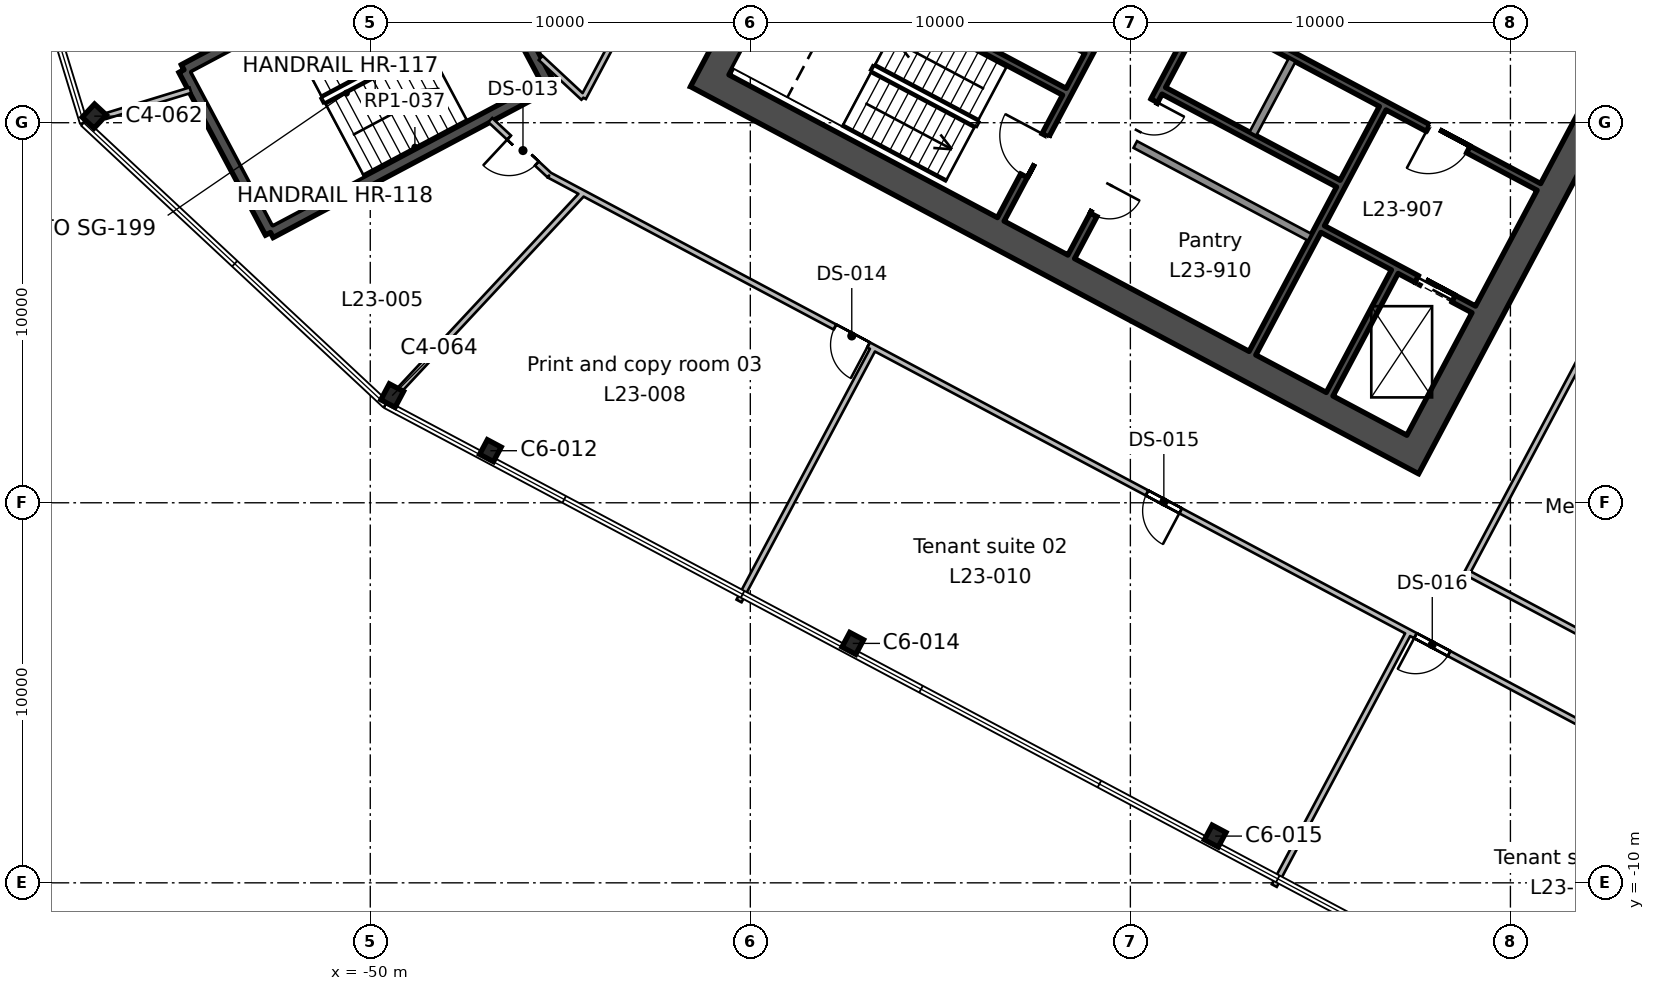
"""IFC4 building model, lengths in metres.
Left out: names, types, materials, properties, quantities, classifications, styles, units other than length and angle.
Written with IfcOpenShell. Run it as: python <this file> out.ifc"""

import sys

from ifc_helpers import new_model, si_unit, direction, frame, frame_2d, origin, origin_2d, place, context, subcontext, project, spatial, rectangle, i_section, extrude, element, fill, save


model = new_model("IFC4")
c1 = context("Model", 3, precision=1e-05, world=origin(), true_north=direction((0.0, 1.0)))
c2 = subcontext(c1, "Body", "Model", "MODEL_VIEW")
j1 = project(units=[si_unit("LENGTHUNIT", "METRE"), si_unit("PLANEANGLEUNIT", "RADIAN")], contexts=[c1])
p1 = place(None, origin())
s1 = spatial("IfcSite", under=j1, at=p1, CompositionType="ELEMENT")
p2 = place(p1, origin())
s2 = spatial("IfcBuilding", under=s1, at=p2, CompositionType="ELEMENT")
p3 = place(p2, frame((0.0, 0.0, 118.2)))
s3 = spatial("IfcBuildingStorey", under=s2, at=p3, CompositionType="ELEMENT", Elevation=118.2)
for number, where, z_axis, x_axis in (
    (1, (-27.768, -8.77, 0.0), (0.0, 0.0, 1.0), (0.883, -0.469, 0.0)),
    (2, (-37.304, -3.7, 0.0), (0.0, 0.0, 1.0), (0.883, -0.469, 0.0)),
    (3, (-46.839, 1.37, 0.0), (0.0, 0.0, 1.0), (0.883, -0.469, 0.0)),
):
    element("IfcColumn", number, at=place(p3, frame(where, z_axis=z_axis, x_axis=x_axis)), inside=s3, PredefinedType="COLUMN", context=c2, shape_type="SweptSolid", body=[
        extrude(i_section(OverallWidth=0.412, OverallDepth=0.434, WebThickness=0.036, FlangeThickness=0.057, FilletRadius=0.015, at=origin_2d()), origin(), (0.0, 0.0, 1.0), 4.0),
    ])
for number, where, z_axis, x_axis in (
    (4, (-49.423, 2.82, 0.0), (0.0, 0.0, 1.0), (0.883, -0.469, 0.0)),
    (5, (-57.262, 10.173, 0.0), (0.0, 0.0, 1.0), (0.731, -0.682, 0.0)),
):
    element("IfcColumn", number, at=place(p3, frame(where, z_axis=z_axis, x_axis=x_axis)), inside=s3, PredefinedType="COLUMN", context=c2, shape_type="SweptSolid", body=[
        extrude(i_section(OverallWidth=0.424, OverallDepth=0.475, WebThickness=0.048, FlangeThickness=0.077, FilletRadius=0.015, at=origin_2d()), origin(), (0.0, 0.0, 1.0), 4.0),
    ])
p4 = place(p3, frame((-13.498, 18.333, 0.0), z_axis=(0.0, 0.0, 1.0), x_axis=(-0.469469918705, -0.88294846703, 0.0)))
e6 = element("IfcWall", 6, at=p4, inside=s3, PredefinedType="SHEAR", context=c2, shape_type="SweptSolid", body=[
    extrude(rectangle(XDim=19.7, YDim=0.75, at=frame_2d((9.85, 0.0))), origin(), (0.0, 0.0, 1.0), 4.0),
])
p5 = place(p4, frame((6.85, 0.0, 0.0)))
e7 = element("IfcOpeningElement", 7, at=p5, cuts=e6, PredefinedType="OPENING", context=c2, shape_type="SweptSolid", body=[
    extrude(rectangle(XDim=2.4, YDim=2.4, at=frame_2d((1.2, 1.2))), frame((0.0, 0.385, 0.0), z_axis=(0.0, -1.0, 0.0), x_axis=(1.0, 0.0, 0.0)), (0.0, 0.0, 1.0), 0.77),
])
p6 = place(p3, frame((-31.996, 28.168, 0.0), z_axis=(0.0, 0.0, 1.0), x_axis=(-0.469479580143, -0.882943329908, 0.0)))
e8 = element("IfcWall", 8, at=p6, inside=s3, PredefinedType="SHEAR", context=c2, shape_type="SweptSolid", body=[
    extrude(rectangle(XDim=19.7, YDim=0.75, at=frame_2d((9.85, 0.0))), origin(), (0.0, 0.0, 1.0), 4.0),
])
p7 = place(p6, frame((10.45, 0.0, 0.0)))
e9 = element("IfcOpeningElement", 9, at=p7, cuts=e8, PredefinedType="OPENING", context=c2, shape_type="SweptSolid", body=[
    extrude(rectangle(XDim=2.4, YDim=2.4, at=frame_2d((1.2, 1.2))), frame((0.0, 0.385, 0.0), z_axis=(0.0, -1.0, 0.0), x_axis=(1.0, 0.0, 0.0)), (0.0, 0.0, 1.0), 0.77),
])
p8 = place(p3, frame((-22.902, 1.446, 0.0), z_axis=(0.0, 0.0, 1.0), x_axis=(-0.88294509198, 0.469476266226, 0.0)))
e10 = element("IfcWall", 10, at=p8, inside=s3, PredefinedType="SHEAR", context=c2, shape_type="SweptSolid", body=[
    extrude(rectangle(XDim=20.2, YDim=0.75, at=frame_2d((10.1, 0.0))), origin(), (0.0, 0.0, 1.0), 4.0),
])
p9 = place(p3, frame((-23.043, 6.08, 0.0), z_axis=(0.0, 0.0, 1.0), x_axis=(-0.469494272526, -0.882935517501, 0.0)))
e11 = element("IfcWall", 11, at=p9, inside=s3, PredefinedType="SHEAR", context=c2, shape_type="SweptSolid", body=[
    extrude(rectangle(XDim=3.65, YDim=0.2, at=frame_2d((1.825, 0.0))), origin(), (0.0, 0.0, 1.0), 4.0),
])
p10 = place(p3, frame((-23.36, 10.382, 0.0), z_axis=(0.0, 0.0, 1.0), x_axis=(-0.469480409012, -0.88294288918, 0.0)))
e12 = element("IfcWall", 12, at=p10, inside=s3, PredefinedType="SHEAR", context=c2, shape_type="SweptSolid", body=[
    extrude(rectangle(XDim=7.3, YDim=0.2, at=frame_2d((3.65, 0.0))), origin(), (0.0, 0.0, 1.0), 4.0),
])
p11 = place(p3, frame((-25.744, 11.65, 0.0), z_axis=(0.0, 0.0, 1.0), x_axis=(-0.469487830541, -0.882938942948, 0.0)))
e13 = element("IfcWall", 13, at=p11, inside=s3, PredefinedType="SOLIDWALL", context=c2, shape_type="SweptSolid", body=[
    extrude(rectangle(XDim=2.2, YDim=0.2, at=frame_2d((1.1, 0.0))), origin(), (0.0, 0.0, 1.0), 4.0),
])
p12 = place(p3, frame((-28.128, 12.917, 0.0), z_axis=(0.0, 0.0, 1.0), x_axis=(-0.469454336211, -0.882956752176, 0.0)))
e14 = element("IfcWall", 14, at=p12, inside=s3, PredefinedType="SHEAR", context=c2, shape_type="SweptSolid", body=[
    extrude(rectangle(XDim=7.3, YDim=0.2, at=frame_2d((3.65, 0.0))), origin(), (0.0, 0.0, 1.0), 4.0),
])
p13 = place(p12, frame((2.65, 0.0, 0.0)))
e15 = element("IfcOpeningElement", 15, at=p13, cuts=e14, PredefinedType="OPENING", context=c2, shape_type="SweptSolid", body=[
    extrude(rectangle(XDim=0.9, YDim=2.1, at=frame_2d((0.45, 1.05))), frame((0.0, 0.11, 0.0), z_axis=(0.0, -1.0, 0.0), x_axis=(1.0, 0.0, 0.0)), (0.0, 0.0, 1.0), 0.22),
])
p14 = place(p12, frame((5.15, 0.0, 0.0)))
e16 = element("IfcOpeningElement", 16, at=p14, cuts=e14, PredefinedType="OPENING", context=c2, shape_type="SweptSolid", body=[
    extrude(rectangle(XDim=0.9, YDim=2.1, at=frame_2d((0.45, 1.05))), frame((0.0, 0.11, 0.0), z_axis=(0.0, -1.0, 0.0), x_axis=(1.0, 0.0, 0.0)), (0.0, 0.0, 1.0), 0.22),
])
p15 = place(p3, frame((-29.982, 13.903, 0.0), z_axis=(0.0, 0.0, 1.0), x_axis=(-0.469454336211, -0.882956752176, 0.0)))
e17 = element("IfcWall", 17, at=p15, inside=s3, PredefinedType="SHEAR", context=c2, shape_type="SweptSolid", body=[
    extrude(rectangle(XDim=7.3, YDim=0.2, at=frame_2d((3.65, 0.0))), origin(), (0.0, 0.0, 1.0), 4.0),
])
p16 = place(p15, frame((4.8, 0.0, 0.0)))
e18 = element("IfcOpeningElement", 18, at=p16, cuts=e17, PredefinedType="OPENING", context=c2, shape_type="SweptSolid", body=[
    extrude(rectangle(XDim=1.2, YDim=2.1, at=frame_2d((0.6, 1.05))), frame((0.0, 0.11, 0.0), z_axis=(0.0, -1.0, 0.0), x_axis=(1.0, 0.0, 0.0)), (0.0, 0.0, 1.0), 0.22),
])
p17 = place(p3, frame((-19.252, 8.311, 0.0), z_axis=(0.0, 0.0, 1.0), x_axis=(-0.882955722218, 0.469456273365, 0.0)))
e19 = element("IfcWall", 19, at=p17, inside=s3, PredefinedType="SHEAR", context=c2, shape_type="SweptSolid", body=[
    extrude(rectangle(XDim=10.0, YDim=0.2, at=frame_2d((5.0, 0.0))), origin(), (0.0, 0.0, 1.0), 4.0),
])
p18 = place(p17, frame((2.1, 0.0, 0.0)))
e20 = element("IfcOpeningElement", 20, at=p18, cuts=e19, PredefinedType="OPENING", context=c2, shape_type="SweptSolid", body=[
    extrude(rectangle(XDim=1.2, YDim=2.1, at=frame_2d((0.6, 1.05))), frame((0.0, 0.11, 0.0), z_axis=(0.0, -1.0, 0.0), x_axis=(1.0, 0.0, 0.0)), (0.0, 0.0, 1.0), 0.22),
])
p19 = place(p3, frame((-24.528, 8.398, 0.0), z_axis=(0.0, 0.0, 1.0), x_axis=(-0.882953967957, 0.469459572775, 0.0)))
e21 = element("IfcWall", 21, at=p19, inside=s3, PredefinedType="SHEAR", context=c2, shape_type="SweptSolid", body=[
    extrude(rectangle(XDim=5.2, YDim=0.2, at=frame_2d((2.6, 0.0))), origin(), (0.0, 0.0, 1.0), 4.0),
])
p20 = place(p3, frame((-31.15, 11.919, 0.0), z_axis=(0.0, 0.0, 1.0), x_axis=(-0.882940221191, 0.469485426614, 0.0)))
e22 = element("IfcWall", 22, at=p20, inside=s3, PredefinedType="SHEAR", context=c2, shape_type="SweptSolid", body=[
    extrude(rectangle(XDim=8.0, YDim=0.2, at=frame_2d((4.0, 0.0))), origin(), (0.0, 0.0, 1.0), 4.0),
])
p21 = place(p3, frame((-20.965, 5.088, 0.0), z_axis=(0.0, 0.0, 1.0), x_axis=(-0.882925986334, 0.469512196493, 0.0)))
e23 = element("IfcWall", 23, at=p21, inside=s3, PredefinedType="SHEAR", context=c2, shape_type="SweptSolid", body=[
    extrude(rectangle(XDim=4.5, YDim=0.2, at=frame_2d((2.25, 0.0))), origin(), (0.0, 0.0, 1.0), 4.0),
])
p22 = place(p21, frame((0.6, 0.0, 0.0)))
e24 = element("IfcOpeningElement", 24, at=p22, cuts=e23, PredefinedType="OPENING", context=c2, shape_type="SweptSolid", body=[
    extrude(rectangle(XDim=1.1, YDim=2.1, at=frame_2d((0.55, 1.05))), frame((0.0, 0.11, 0.0), z_axis=(0.0, -1.0, 0.0), x_axis=(1.0, 0.0, 0.0)), (0.0, 0.0, 1.0), 0.22),
])
p23 = place(p3, frame((-31.737, 10.816, 0.0), z_axis=(0.0, 0.0, 1.0), x_axis=(-0.882940221191, 0.469485426614, 0.0)))
e25 = element("IfcWall", 25, at=p23, inside=s3, PredefinedType="SHEAR", context=c2, shape_type="SweptSolid", body=[
    extrude(rectangle(XDim=8.0, YDim=0.2, at=frame_2d((4.0, 0.0))), origin(), (0.0, 0.0, 1.0), 4.0),
])
p24 = place(p3, frame((-25.28, 6.986, 0.0), z_axis=(0.0, 0.0, 1.0), x_axis=(-0.882934506056, 0.469496174655, 0.0)))
e26 = element("IfcWall", 26, at=p24, inside=s3, PredefinedType="SOLIDWALL", context=c2, shape_type="SweptSolid", body=[
    extrude(rectangle(XDim=5.2, YDim=0.2, at=frame_2d((2.6, 0.0))), origin(), (0.0, 0.0, 1.0), 4.0),
])
p25 = place(p3, frame((-47.574, 15.29, 0.0), z_axis=(0.0, 0.0, 1.0), x_axis=(0.469443498566, -0.882962514297, 0.0)))
e27 = element("IfcWall", 27, at=p25, inside=s3, PredefinedType="SHEAR", context=c2, shape_type="SweptSolid", body=[
    extrude(rectangle(XDim=4.85, YDim=0.3, at=frame_2d((2.425, 0.0))), origin(), (0.0, 0.0, 1.0), 4.0),
])
p26 = place(p3, frame((-45.297, 11.007, 0.0), z_axis=(0.0, 0.0, 1.0), x_axis=(-0.882951519127, -0.469464178475, 0.0)))
e28 = element("IfcWall", 28, at=p26, inside=s3, PredefinedType="SHEAR", context=c2, shape_type="SweptSolid", body=[
    extrude(rectangle(XDim=8.3, YDim=0.3, at=frame_2d((4.15, 0.0))), origin(), (0.0, 0.0, 1.0), 4.0),
])
p27 = place(p3, frame((-52.626, 7.111, 0.0), z_axis=(0.0, 0.0, 1.0), x_axis=(-0.469464364128, 0.882951420416, 0.0)))
e29 = element("IfcWall", 29, at=p27, inside=s3, PredefinedType="SHEAR", context=c2, shape_type="SweptSolid", body=[
    extrude(rectangle(XDim=4.85, YDim=0.3, at=frame_2d((2.425, 0.0))), origin(), (0.0, 0.0, 1.0), 4.0),
])
p28 = place(p3, frame((-54.903, 11.393, 0.0), z_axis=(0.0, 0.0, 1.0), x_axis=(0.882939326045, 0.469487110071, 0.0)))
e30 = element("IfcWall", 30, at=p28, inside=s3, PredefinedType="SHEAR", context=c2, shape_type="SweptSolid", body=[
    extrude(rectangle(XDim=8.3, YDim=0.3, at=frame_2d((4.15, 0.0))), origin(), (0.0, 0.0, 1.0), 4.0),
])
p29 = place(p28, frame((6.05, 0.0, 0.0)))
e31 = element("IfcOpeningElement", 31, at=p29, cuts=e30, PredefinedType="OPENING", context=c2, shape_type="SweptSolid", body=[
    extrude(rectangle(XDim=1.9, YDim=2.1, at=frame_2d((0.95, 1.05))), frame((0.0, 0.16, 0.0), z_axis=(0.0, -1.0, 0.0), x_axis=(1.0, 0.0, 0.0)), (0.0, 0.0, 1.0), 0.32),
])
p30 = place(p3, frame((-54.732, 10.857, 0.0), z_axis=(0.0, 0.0, 1.0), x_axis=(-0.956196980242, -0.292723991119, 0.0)))
e32 = element("IfcWall", 32, at=p30, inside=s3, PredefinedType="PARTITIONING", context=c2, shape_type="SweptSolid", body=[
    extrude(rectangle(XDim=2.344, YDim=0.15, at=frame_2d((1.172, 0.0))), origin(), (0.0, 0.0, 1.0), 3.64),
])
p31 = place(p3, frame((-44.402, 8.149, 0.0), z_axis=(0.0, 0.0, 1.0), x_axis=(-0.682039957921, -0.731314908777, 0.0)))
e33 = element("IfcWall", 33, at=p31, inside=s3, PredefinedType="PARTITIONING", context=c2, shape_type="SweptSolid", body=[
    extrude(rectangle(XDim=7.065, YDim=0.15, at=frame_2d((3.533, 0.0))), origin(), (0.0, 0.0, 1.0), 3.64),
])
p32 = place(p3, frame((-36.752, 4.082, 0.0), z_axis=(0.0, 0.0, 1.0), x_axis=(-0.46955237308, -0.88290462052, 0.0)))
e34 = element("IfcWall", 34, at=p32, inside=s3, PredefinedType="PARTITIONING", context=c2, shape_type="SweptSolid", body=[
    extrude(rectangle(XDim=7.55, YDim=0.15, at=frame_2d((3.775, 0.0))), origin(), (0.0, 0.0, 1.0), 3.64),
])
p33 = place(p3, frame((-33.66, 30.844, 0.0), z_axis=(0.0, 0.0, 1.0), x_axis=(-0.469473234242, -0.882946704128, 0.0)))
e35 = element("IfcWall", 35, at=p33, inside=s3, PredefinedType="PARTITIONING", context=c2, shape_type="SweptSolid", body=[
    extrude(rectangle(XDim=22.862, YDim=0.15, at=frame_2d((11.431, 0.0))), origin(), (0.0, 0.0, 1.0), 3.64),
])
p34 = place(p3, frame((-44.393, 10.658, 0.0), z_axis=(0.0, 0.0, 1.0), x_axis=(-0.731694425371, 0.681632795485, 0.0)))
e36 = element("IfcWall", 36, at=p34, inside=s3, PredefinedType="PARTITIONING", context=c2, shape_type="SweptSolid", body=[
    extrude(rectangle(XDim=1.536, YDim=0.15, at=frame_2d((0.768, 0.0))), origin(), (0.0, 0.0, 1.0), 3.64),
])
p35 = place(p3, frame((-44.462, 8.181, 0.0), z_axis=(0.0, 0.0, 1.0), x_axis=(-0.882750253305, 0.469842516478, 0.0)))
e37 = element("IfcWall", 37, at=p35, inside=s3, PredefinedType="PARTITIONING", context=c2, shape_type="SweptSolid", body=[
    extrude(rectangle(XDim=0.935, YDim=0.15, at=frame_2d((0.467, 0.0))), origin(), (0.0, 0.0, 1.0), 3.64),
])
p36 = place(p3, frame((-45.287, 8.62, 0.0), z_axis=(0.0, 0.0, 1.0), x_axis=(-0.731593637228, 0.681740969846, 0.0)))
e38 = element("IfcWall", 38, at=p36, inside=s3, PredefinedType="PARTITIONING", context=c2, shape_type="SweptSolid", body=[
    extrude(rectangle(XDim=2.125, YDim=0.15, at=frame_2d((1.063, 0.0))), origin(), (0.0, 0.0, 1.0), 3.64),
])
p37 = place(p36, frame((0.45, 0.0, 0.0)))
e39 = element("IfcOpeningElement", 39, at=p37, cuts=e38, PredefinedType="OPENING", context=c2, shape_type="SweptSolid", body=[
    extrude(rectangle(XDim=1.0, YDim=2.1, at=frame_2d((0.5, 1.05))), frame((0.0, 0.085, 0.0), z_axis=(0.0, -1.0, 0.0), x_axis=(1.0, 0.0, 0.0)), (0.0, 0.0, 1.0), 0.17),
])
p38 = place(p3, frame((-13.8, -8.122, 0.0), z_axis=(0.0, 0.0, 1.0), x_axis=(-0.882950271686, 0.469466524611, 0.0)))
e40 = element("IfcWall", 40, at=p38, inside=s3, PredefinedType="PARTITIONING", context=c2, shape_type="SweptSolid", body=[
    extrude(rectangle(XDim=34.727, YDim=0.15, at=frame_2d((17.363, 0.0))), origin(), (0.0, 0.0, 1.0), 3.64),
])
p39 = place(p38, frame((26.15, 0.0, 0.0)))
e41 = element("IfcOpeningElement", 41, at=p39, cuts=e40, PredefinedType="OPENING", context=c2, shape_type="SweptSolid", body=[
    extrude(rectangle(XDim=1.0, YDim=2.1, at=frame_2d((0.5, 1.05))), frame((0.0, 0.085, 0.0), z_axis=(0.0, -1.0, 0.0), x_axis=(1.0, 0.0, 0.0)), (0.0, 0.0, 1.0), 0.17),
])
p40 = place(p38, frame((16.85, 0.0, 0.0)))
e42 = element("IfcOpeningElement", 42, at=p40, cuts=e40, PredefinedType="OPENING", context=c2, shape_type="SweptSolid", body=[
    extrude(rectangle(XDim=1.0, YDim=2.1, at=frame_2d((0.5, 1.05))), frame((0.0, 0.085, 0.0), z_axis=(0.0, -1.0, 0.0), x_axis=(1.0, 0.0, 0.0)), (0.0, 0.0, 1.0), 0.17),
])
p41 = place(p38, frame((8.851, 0.0, 0.0)))
e43 = element("IfcOpeningElement", 43, at=p41, cuts=e40, PredefinedType="OPENING", context=c2, shape_type="SweptSolid", body=[
    extrude(rectangle(XDim=1.0, YDim=2.1, at=frame_2d((0.5, 1.05))), frame((0.0, 0.085, 0.0), z_axis=(0.0, -1.0, 0.0), x_axis=(1.0, 0.0, 0.0)), (0.0, 0.0, 1.0), 0.17),
])
p42 = place(p3, frame((-22.67, -3.406, 0.0), z_axis=(0.0, 0.0, 1.0), x_axis=(-0.469451537303, -0.882958240306, 0.0)))
e44 = element("IfcWall", 44, at=p42, inside=s3, PredefinedType="PARTITIONING", context=c2, shape_type="SweptSolid", body=[
    extrude(rectangle(XDim=7.55, YDim=0.15, at=frame_2d((3.775, 0.0))), origin(), (0.0, 0.0, 1.0), 3.64),
])
p43 = place(p3, frame((-21.139, -1.841, 0.0), z_axis=(0.0, 0.0, 1.0), x_axis=(0.46947923089, 0.882943515613, 0.0)))
e45 = element("IfcWall", 45, at=p43, inside=s3, PredefinedType="PARTITIONING", context=c2, shape_type="SweptSolid", body=[
    extrude(rectangle(XDim=23.1, YDim=0.15, at=frame_2d((11.55, 0.0))), origin(), (0.0, 0.0, 1.0), 3.64),
])
p44 = place(p43, frame((11.05, 0.0, 0.0)))
e46 = element("IfcOpeningElement", 46, at=p44, cuts=e45, PredefinedType="OPENING", context=c2, shape_type="SweptSolid", body=[
    extrude(rectangle(XDim=1.0, YDim=2.1, at=frame_2d((0.5, 1.05))), frame((0.0, 0.085, 0.0), z_axis=(0.0, -1.0, 0.0), x_axis=(1.0, 0.0, 0.0)), (0.0, 0.0, 1.0), 0.17),
])
p45 = place(p3, frame((-13.8, -5.744, 0.0), z_axis=(0.0, 0.0, 1.0), x_axis=(-0.882913323819, 0.469536007803, 0.0)))
e47 = element("IfcWall", 47, at=p45, inside=s3, PredefinedType="PARTITIONING", context=c2, shape_type="SweptSolid", body=[
    extrude(rectangle(XDim=8.312, YDim=0.15, at=frame_2d((4.156, 0.0))), origin(), (0.0, 0.0, 1.0), 3.64),
])
p46 = place(p18, origin())
e48 = element("IfcDoor", 48, at=p46, inside=s3, OperationType="SINGLE_SWING_RIGHT", PredefinedType="DOOR", context=c2, shape_type="SweptSolid", body=[
    extrude(rectangle(XDim=1.2, YDim=2.1, at=frame_2d((0.6, 1.05))), frame((0.0, 0.025, 0.0), z_axis=(0.0, -1.0, 0.0), x_axis=(1.0, 0.0, 0.0)), (0.0, 0.0, 1.0), 0.05),
])
fill(e20, e48)
p47 = place(p16, frame((1.2, 0.0, 0.0), z_axis=(0.0, 0.0, 1.0), x_axis=(-1.0, 0.0, 0.0)))
e49 = element("IfcDoor", 49, at=p47, inside=s3, OperationType="SINGLE_SWING_RIGHT", PredefinedType="DOOR", context=c2, shape_type="SweptSolid", body=[
    extrude(rectangle(XDim=1.2, YDim=2.1, at=frame_2d((0.6, 1.05))), frame((0.0, 0.025, 0.0), z_axis=(0.0, -1.0, 0.0), x_axis=(1.0, 0.0, 0.0)), (0.0, 0.0, 1.0), 0.05),
])
fill(e18, e49)
p48 = place(p22, origin())
e50 = element("IfcDoor", 50, at=p48, inside=s3, OperationType="DOUBLE_DOOR_SLIDING", PredefinedType="DOOR", context=c2, shape_type="SweptSolid", body=[
    extrude(rectangle(XDim=1.1, YDim=2.1, at=frame_2d((0.55, 1.05))), frame((0.0, 0.025, 0.0), z_axis=(0.0, -1.0, 0.0), x_axis=(1.0, 0.0, 0.0)), (0.0, 0.0, 1.0), 0.05),
])
fill(e24, e50)
p49 = place(p13, origin())
e51 = element("IfcDoor", 51, at=p49, inside=s3, OperationType="SINGLE_SWING_LEFT", PredefinedType="DOOR", context=c2, shape_type="SweptSolid", body=[
    extrude(rectangle(XDim=0.9, YDim=2.1, at=frame_2d((0.45, 1.05))), frame((0.0, 0.025, 0.0), z_axis=(0.0, -1.0, 0.0), x_axis=(1.0, 0.0, 0.0)), (0.0, 0.0, 1.0), 0.05),
])
fill(e15, e51)
p50 = place(p14, origin())
e52 = element("IfcDoor", 52, at=p50, inside=s3, OperationType="SINGLE_SWING_LEFT", PredefinedType="DOOR", context=c2, shape_type="SweptSolid", body=[
    extrude(rectangle(XDim=0.9, YDim=2.1, at=frame_2d((0.45, 1.05))), frame((0.0, 0.025, 0.0), z_axis=(0.0, -1.0, 0.0), x_axis=(1.0, 0.0, 0.0)), (0.0, 0.0, 1.0), 0.05),
])
fill(e16, e52)
p51 = place(p37, origin())
e53 = element("IfcDoor", 53, at=p51, inside=s3, OperationType="SINGLE_SWING_RIGHT", PredefinedType="DOOR", context=c2, shape_type="SweptSolid", body=[
    extrude(rectangle(XDim=1.0, YDim=2.1, at=frame_2d((0.5, 1.05))), frame((0.0, 0.025, 0.0), z_axis=(0.0, -1.0, 0.0), x_axis=(1.0, 0.0, 0.0)), (0.0, 0.0, 1.0), 0.05),
])
fill(e39, e53)
p52 = place(p39, origin())
e54 = element("IfcDoor", 54, at=p52, inside=s3, OperationType="SINGLE_SWING_LEFT", PredefinedType="DOOR", context=c2, shape_type="SweptSolid", body=[
    extrude(rectangle(XDim=1.0, YDim=2.1, at=frame_2d((0.5, 1.05))), frame((0.0, 0.025, 0.0), z_axis=(0.0, -1.0, 0.0), x_axis=(1.0, 0.0, 0.0)), (0.0, 0.0, 1.0), 0.05),
])
fill(e41, e54)
p53 = place(p40, origin())
e55 = element("IfcDoor", 55, at=p53, inside=s3, OperationType="SINGLE_SWING_LEFT", PredefinedType="DOOR", context=c2, shape_type="SweptSolid", body=[
    extrude(rectangle(XDim=1.0, YDim=2.1, at=frame_2d((0.5, 1.05))), frame((0.0, 0.025, 0.0), z_axis=(0.0, -1.0, 0.0), x_axis=(1.0, 0.0, 0.0)), (0.0, 0.0, 1.0), 0.05),
])
fill(e42, e55)
p54 = place(p41, origin())
e56 = element("IfcDoor", 56, at=p54, inside=s3, OperationType="SINGLE_SWING_RIGHT", PredefinedType="DOOR", context=c2, shape_type="SweptSolid", body=[
    extrude(rectangle(XDim=1.0, YDim=2.1, at=frame_2d((0.5, 1.05))), frame((0.0, 0.025, 0.0), z_axis=(0.0, -1.0, 0.0), x_axis=(1.0, 0.0, 0.0)), (0.0, 0.0, 1.0), 0.05),
])
fill(e43, e56)
save(model, sys.argv[1])
